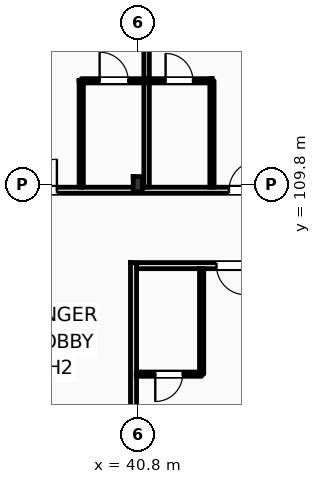
"""IFC4 building model, lengths in metres.
Left out: names, types, materials, properties, quantities, classifications, styles, units other than length and angle.
Written with IfcOpenShell. Run it as: python <this file> out.ifc"""

import sys

from ifc_helpers import new_model, si_unit, direction, frame, frame_2d, origin, origin_2d, place, context, subcontext, project, spatial, rectangle, i_section, extrude, element, fill, save


model = new_model("IFC4")
c1 = context("Model", 3, precision=1e-05, world=origin(), true_north=direction((0.0, 1.0)))
c2 = subcontext(c1, "Body", "Model", "MODEL_VIEW")
j1 = project(units=[si_unit("LENGTHUNIT", "METRE"), si_unit("PLANEANGLEUNIT", "RADIAN")], contexts=[c1])
p1 = place(None, origin())
s1 = spatial("IfcSite", under=j1, at=p1, CompositionType="ELEMENT")
p2 = place(p1, origin())
s2 = spatial("IfcBuilding", under=s1, at=p2, CompositionType="ELEMENT")
p3 = place(p2, frame((0.0, 0.0, 35.4)))
s3 = spatial("IfcBuildingStorey", under=s2, at=p3, CompositionType="ELEMENT", Elevation=35.4)
p4 = place(p3, frame((40.8, 109.8, 0.0), z_axis=(0.0, 0.0, 1.0), x_axis=(1.0, 0.0, 0.0)))
e1 = element("IfcColumn", 1, at=p4, inside=s3, PredefinedType="COLUMN", context=c2, shape_type="SweptSolid", body=[
    extrude(i_section(OverallWidth=0.3, OverallDepth=0.5, WebThickness=0.014, FlangeThickness=0.028, FilletRadius=0.027, at=origin_2d()), origin(), (0.0, 0.0, 1.0), 3.6),
])
p5 = place(p3, frame((10.65, 109.6, 0.0), z_axis=(0.0, 0.0, 1.0), x_axis=(1.0, 0.0, 0.0)))
e2 = element("IfcWall", 2, at=p5, inside=s3, PredefinedType="PARTITIONING", context=c2, shape_type="SweptSolid", body=[
    extrude(rectangle(XDim=84.61, YDim=0.2, at=frame_2d((42.305, 0.0))), origin(), (0.0, 0.0, 1.0), 2.82),
])
p6 = place(p5, frame((12.675, 0.0, 0.0)))
e3 = element("IfcOpeningElement", 3, at=p6, cuts=e2, PredefinedType="OPENING", context=c2, shape_type="SweptSolid", body=[
    extrude(rectangle(XDim=1.02, YDim=2.2, at=frame_2d((0.51, 1.1))), frame((0.0, 0.11, 0.0), z_axis=(0.0, -1.0, 0.0), x_axis=(1.0, 0.0, 0.0)), (0.0, 0.0, 1.0), 0.22),
])
p7 = place(p5, frame((19.62, 0.0, 0.0)))
e4 = element("IfcOpeningElement", 4, at=p7, cuts=e2, PredefinedType="OPENING", context=c2, shape_type="SweptSolid", body=[
    extrude(rectangle(XDim=1.02, YDim=2.2, at=frame_2d((0.51, 1.1))), frame((0.0, 0.11, 0.0), z_axis=(0.0, -1.0, 0.0), x_axis=(1.0, 0.0, 0.0)), (0.0, 0.0, 1.0), 0.22),
])
p8 = place(p5, frame((24.12, 0.0, 0.0)))
e5 = element("IfcOpeningElement", 5, at=p8, cuts=e2, PredefinedType="OPENING", context=c2, shape_type="SweptSolid", body=[
    extrude(rectangle(XDim=1.02, YDim=2.2, at=frame_2d((0.51, 1.1))), frame((0.0, 0.11, 0.0), z_axis=(0.0, -1.0, 0.0), x_axis=(1.0, 0.0, 0.0)), (0.0, 0.0, 1.0), 0.22),
])
p9 = place(p5, frame((26.47, 0.0, 0.0)))
e6 = element("IfcOpeningElement", 6, at=p9, cuts=e2, PredefinedType="OPENING", context=c2, shape_type="SweptSolid", body=[
    extrude(rectangle(XDim=1.02, YDim=2.2, at=frame_2d((0.51, 1.1))), frame((0.0, 0.11, 0.0), z_axis=(0.0, -1.0, 0.0), x_axis=(1.0, 0.0, 0.0)), (0.0, 0.0, 1.0), 0.22),
])
p10 = place(p5, frame((33.15, 0.0, 0.0)))
e7 = element("IfcOpeningElement", 7, at=p10, cuts=e2, PredefinedType="OPENING", context=c2, shape_type="SweptSolid", body=[
    extrude(rectangle(XDim=0.96, YDim=2.2, at=frame_2d((0.48, 1.1))), frame((0.0, 0.11, 0.0), z_axis=(0.0, -1.0, 0.0), x_axis=(1.0, 0.0, 0.0)), (0.0, 0.0, 1.0), 0.22),
])
p11 = place(p5, frame((35.5, 0.0, 0.0)))
e8 = element("IfcOpeningElement", 8, at=p11, cuts=e2, PredefinedType="OPENING", context=c2, shape_type="SweptSolid", body=[
    extrude(rectangle(XDim=0.96, YDim=2.2, at=frame_2d((0.48, 1.1))), frame((0.0, 0.11, 0.0), z_axis=(0.0, -1.0, 0.0), x_axis=(1.0, 0.0, 0.0)), (0.0, 0.0, 1.0), 0.22),
])
p12 = place(p5, frame((42.15, 0.0, 0.0)))
e9 = element("IfcOpeningElement", 9, at=p12, cuts=e2, PredefinedType="OPENING", context=c2, shape_type="SweptSolid", body=[
    extrude(rectangle(XDim=0.96, YDim=2.2, at=frame_2d((0.48, 1.1))), frame((0.0, 0.11, 0.0), z_axis=(0.0, -1.0, 0.0), x_axis=(1.0, 0.0, 0.0)), (0.0, 0.0, 1.0), 0.22),
])
p13 = place(p5, frame((47.15, 0.0, 0.0)))
e10 = element("IfcOpeningElement", 10, at=p13, cuts=e2, PredefinedType="OPENING", context=c2, shape_type="SweptSolid", body=[
    extrude(rectangle(XDim=0.96, YDim=2.2, at=frame_2d((0.48, 1.1))), frame((0.0, 0.11, 0.0), z_axis=(0.0, -1.0, 0.0), x_axis=(1.0, 0.0, 0.0)), (0.0, 0.0, 1.0), 0.22),
])
p14 = place(p5, frame((51.15, 0.0, 0.0)))
e11 = element("IfcOpeningElement", 11, at=p14, cuts=e2, PredefinedType="OPENING", context=c2, shape_type="SweptSolid", body=[
    extrude(rectangle(XDim=0.96, YDim=2.2, at=frame_2d((0.48, 1.1))), frame((0.0, 0.11, 0.0), z_axis=(0.0, -1.0, 0.0), x_axis=(1.0, 0.0, 0.0)), (0.0, 0.0, 1.0), 0.22),
])
p15 = place(p5, frame((55.65, 0.0, 0.0)))
e12 = element("IfcOpeningElement", 12, at=p15, cuts=e2, PredefinedType="OPENING", context=c2, shape_type="SweptSolid", body=[
    extrude(rectangle(XDim=0.96, YDim=2.2, at=frame_2d((0.48, 1.1))), frame((0.0, 0.11, 0.0), z_axis=(0.0, -1.0, 0.0), x_axis=(1.0, 0.0, 0.0)), (0.0, 0.0, 1.0), 0.22),
])
p16 = place(p5, frame((58.0, 0.0, 0.0)))
e13 = element("IfcOpeningElement", 13, at=p16, cuts=e2, PredefinedType="OPENING", context=c2, shape_type="SweptSolid", body=[
    extrude(rectangle(XDim=0.96, YDim=2.2, at=frame_2d((0.48, 1.1))), frame((0.0, 0.11, 0.0), z_axis=(0.0, -1.0, 0.0), x_axis=(1.0, 0.0, 0.0)), (0.0, 0.0, 1.0), 0.22),
])
p17 = place(p5, frame((64.65, 0.0, 0.0)))
e14 = element("IfcOpeningElement", 14, at=p17, cuts=e2, PredefinedType="OPENING", context=c2, shape_type="SweptSolid", body=[
    extrude(rectangle(XDim=0.96, YDim=2.2, at=frame_2d((0.48, 1.1))), frame((0.0, 0.11, 0.0), z_axis=(0.0, -1.0, 0.0), x_axis=(1.0, 0.0, 0.0)), (0.0, 0.0, 1.0), 0.22),
])
p18 = place(p5, frame((66.75, 0.0, 0.0)))
e15 = element("IfcOpeningElement", 15, at=p18, cuts=e2, PredefinedType="OPENING", context=c2, shape_type="SweptSolid", body=[
    extrude(rectangle(XDim=0.96, YDim=2.2, at=frame_2d((0.48, 1.1))), frame((0.0, 0.11, 0.0), z_axis=(0.0, -1.0, 0.0), x_axis=(1.0, 0.0, 0.0)), (0.0, 0.0, 1.0), 0.22),
])
p19 = place(p5, frame((73.65, 0.0, 0.0)))
e16 = element("IfcOpeningElement", 16, at=p19, cuts=e2, PredefinedType="OPENING", context=c2, shape_type="SweptSolid", body=[
    extrude(rectangle(XDim=0.96, YDim=2.2, at=frame_2d((0.48, 1.1))), frame((0.0, 0.11, 0.0), z_axis=(0.0, -1.0, 0.0), x_axis=(1.0, 0.0, 0.0)), (0.0, 0.0, 1.0), 0.22),
])
p20 = place(p5, frame((78.4, 0.0, 0.0)))
e17 = element("IfcOpeningElement", 17, at=p20, cuts=e2, PredefinedType="OPENING", context=c2, shape_type="SweptSolid", body=[
    extrude(rectangle(XDim=0.96, YDim=2.2, at=frame_2d((0.48, 1.1))), frame((0.0, 0.11, 0.0), z_axis=(0.0, -1.0, 0.0), x_axis=(1.0, 0.0, 0.0)), (0.0, 0.0, 1.0), 0.22),
])
p21 = place(p5, frame((80.455, 0.0, 0.0)))
e18 = element("IfcOpeningElement", 18, at=p21, cuts=e2, PredefinedType="OPENING", context=c2, shape_type="SweptSolid", body=[
    extrude(rectangle(XDim=0.96, YDim=2.2, at=frame_2d((0.48, 1.1))), frame((0.0, 0.11, 0.0), z_axis=(0.0, -1.0, 0.0), x_axis=(1.0, 0.0, 0.0)), (0.0, 0.0, 1.0), 0.22),
])
p22 = place(p5, frame((2.716, 0.0, 0.0)))
e19 = element("IfcOpeningElement", 19, at=p22, cuts=e2, PredefinedType="OPENING", context=c2, shape_type="SweptSolid", body=[
    extrude(rectangle(XDim=1.35, YDim=2.25, at=frame_2d((0.675, 1.125))), frame((0.0, 0.11, 0.0), z_axis=(0.0, -1.0, 0.0), x_axis=(1.0, 0.0, 0.0)), (0.0, 0.0, 1.0), 0.22),
])
p23 = place(p5, frame((6.65, 0.0, 0.0)))
e20 = element("IfcOpeningElement", 20, at=p23, cuts=e2, PredefinedType="OPENING", context=c2, shape_type="SweptSolid", body=[
    extrude(rectangle(XDim=1.35, YDim=2.25, at=frame_2d((0.675, 1.125))), frame((0.0, 0.11, 0.0), z_axis=(0.0, -1.0, 0.0), x_axis=(1.0, 0.0, 0.0)), (0.0, 0.0, 1.0), 0.22),
])
p24 = place(p5, frame((10.583, 0.0, 0.0)))
e21 = element("IfcOpeningElement", 21, at=p24, cuts=e2, PredefinedType="OPENING", context=c2, shape_type="SweptSolid", body=[
    extrude(rectangle(XDim=1.35, YDim=2.25, at=frame_2d((0.675, 1.125))), frame((0.0, 0.11, 0.0), z_axis=(0.0, -1.0, 0.0), x_axis=(1.0, 0.0, 0.0)), (0.0, 0.0, 1.0), 0.22),
])
p25 = place(p3, frame((40.76, 107.12, 0.0), z_axis=(0.0, 0.0, 1.0), x_axis=(1.0, 0.0, 0.0)))
e22 = element("IfcWall", 22, at=p25, inside=s3, PredefinedType="PARTITIONING", context=c2, shape_type="SweptSolid", body=[
    extrude(rectangle(XDim=23.44, YDim=0.2, at=frame_2d((11.72, 0.0))), origin(), (0.0, 0.0, 1.0), 3.38),
])
p26 = place(p25, frame((2.629, 0.0, 0.0)))
e23 = element("IfcOpeningElement", 23, at=p26, cuts=e22, PredefinedType="OPENING", context=c2, shape_type="SweptSolid", body=[
    extrude(rectangle(XDim=0.96, YDim=2.2, at=frame_2d((0.48, 1.1))), frame((0.0, 0.11, 0.0), z_axis=(0.0, -1.0, 0.0), x_axis=(1.0, 0.0, 0.0)), (0.0, 0.0, 1.0), 0.22),
])
p27 = place(p25, frame((4.343, 0.0, 0.0)))
e24 = element("IfcOpeningElement", 24, at=p27, cuts=e22, PredefinedType="OPENING", context=c2, shape_type="SweptSolid", body=[
    extrude(rectangle(XDim=0.96, YDim=2.2, at=frame_2d((0.48, 1.1))), frame((0.0, 0.11, 0.0), z_axis=(0.0, -1.0, 0.0), x_axis=(1.0, 0.0, 0.0)), (0.0, 0.0, 1.0), 0.22),
])
p28 = place(p25, frame((10.401, 0.0, 0.0)))
e25 = element("IfcOpeningElement", 25, at=p28, cuts=e22, PredefinedType="OPENING", context=c2, shape_type="SweptSolid", body=[
    extrude(rectangle(XDim=0.96, YDim=2.2, at=frame_2d((0.48, 1.1))), frame((0.0, 0.11, 0.0), z_axis=(0.0, -1.0, 0.0), x_axis=(1.0, 0.0, 0.0)), (0.0, 0.0, 1.0), 0.22),
])
p29 = place(p25, frame((12.159, 0.0, 0.0)))
e26 = element("IfcOpeningElement", 26, at=p29, cuts=e22, PredefinedType="OPENING", context=c2, shape_type="SweptSolid", body=[
    extrude(rectangle(XDim=0.96, YDim=2.2, at=frame_2d((0.48, 1.1))), frame((0.0, 0.11, 0.0), z_axis=(0.0, -1.0, 0.0), x_axis=(1.0, 0.0, 0.0)), (0.0, 0.0, 1.0), 0.22),
])
p30 = place(p25, frame((18.218, 0.0, 0.0)))
e27 = element("IfcOpeningElement", 27, at=p30, cuts=e22, PredefinedType="OPENING", context=c2, shape_type="SweptSolid", body=[
    extrude(rectangle(XDim=0.96, YDim=2.2, at=frame_2d((0.48, 1.1))), frame((0.0, 0.11, 0.0), z_axis=(0.0, -1.0, 0.0), x_axis=(1.0, 0.0, 0.0)), (0.0, 0.0, 1.0), 0.22),
])
p31 = place(p25, frame((20.021, 0.0, 0.0)))
e28 = element("IfcOpeningElement", 28, at=p31, cuts=e22, PredefinedType="OPENING", context=c2, shape_type="SweptSolid", body=[
    extrude(rectangle(XDim=0.96, YDim=2.2, at=frame_2d((0.48, 1.1))), frame((0.0, 0.11, 0.0), z_axis=(0.0, -1.0, 0.0), x_axis=(1.0, 0.0, 0.0)), (0.0, 0.0, 1.0), 0.22),
])
p32 = place(p3, frame((40.66, 98.77, 0.0), z_axis=(0.0, 0.0, 1.0), x_axis=(0.0, 1.0, 0.0)))
e29 = element("IfcWall", 29, at=p32, inside=s3, PredefinedType="PARTITIONING", context=c2, shape_type="SweptSolid", body=[
    extrude(rectangle(XDim=8.45, YDim=0.2, at=frame_2d((4.225, 0.0))), origin(), (0.0, 0.0, 1.0), 3.01),
])
p33 = place(p3, frame((41.09, 109.7, 0.0), z_axis=(0.0, 0.0, 1.0), x_axis=(0.0, 1.0, 0.0)))
e30 = element("IfcWall", 30, at=p33, inside=s3, PredefinedType="PARTITIONING", context=c2, shape_type="SweptSolid", body=[
    extrude(rectangle(XDim=8.15, YDim=0.18, at=frame_2d((4.075, 0.0))), origin(), (0.0, 0.0, 1.0), 3.38),
])
p34 = place(p3, frame((38.94, 109.7, 0.0), z_axis=(0.0, 0.0, 1.0), x_axis=(0.0, 1.0, 0.0)))
e31 = element("IfcWall", 31, at=p34, inside=s3, PredefinedType="PARTITIONING", context=c2, shape_type="SweptSolid", body=[
    extrude(rectangle(XDim=3.5, YDim=0.14, at=frame_2d((1.75, 0.0))), origin(), (0.0, 0.0, 1.0), 3.38),
])
p35 = place(p3, frame((38.94, 113.2, 0.0), z_axis=(0.0, 0.0, 1.0), x_axis=(1.0, 0.0, 0.0)))
e32 = element("IfcWall", 32, at=p35, inside=s3, PredefinedType="PARTITIONING", context=c2, shape_type="SweptSolid", body=[
    extrude(rectangle(XDim=2.15, YDim=0.14, at=frame_2d((1.075, 0.0))), origin(), (0.0, 0.0, 1.0), 3.38),
])
p36 = place(p35, frame((0.605, 0.0, 0.0)))
e33 = element("IfcOpeningElement", 33, at=p36, cuts=e32, PredefinedType="OPENING", context=c2, shape_type="SweptSolid", body=[
    extrude(rectangle(XDim=0.94, YDim=2.15, at=frame_2d((0.47, 1.075))), frame((0.0, 0.08, 0.0), z_axis=(0.0, -1.0, 0.0), x_axis=(1.0, 0.0, 0.0)), (0.0, 0.0, 1.0), 0.16),
])
p37 = place(p3, frame((43.24, 109.7, 0.0), z_axis=(0.0, 0.0, 1.0), x_axis=(0.0, 1.0, 0.0)))
e34 = element("IfcWall", 34, at=p37, inside=s3, PredefinedType="PARTITIONING", context=c2, shape_type="SweptSolid", body=[
    extrude(rectangle(XDim=3.5, YDim=0.14, at=frame_2d((1.75, 0.0))), origin(), (0.0, 0.0, 1.0), 3.07),
])
p38 = place(p3, frame((41.09, 113.2, 0.0), z_axis=(0.0, 0.0, 1.0), x_axis=(1.0, 0.0, 0.0)))
e35 = element("IfcWall", 35, at=p38, inside=s3, PredefinedType="PARTITIONING", context=c2, shape_type="SweptSolid", body=[
    extrude(rectangle(XDim=2.15, YDim=0.14, at=frame_2d((1.075, 0.0))), origin(), (0.0, 0.0, 1.0), 3.38),
])
p39 = place(p38, frame((0.625, 0.0, 0.0)))
e36 = element("IfcOpeningElement", 36, at=p39, cuts=e35, PredefinedType="OPENING", context=c2, shape_type="SweptSolid", body=[
    extrude(rectangle(XDim=0.9, YDim=2.1, at=frame_2d((0.45, 1.05))), frame((0.0, 0.08, 0.0), z_axis=(0.0, -1.0, 0.0), x_axis=(1.0, 0.0, 0.0)), (0.0, 0.0, 1.0), 0.16),
])
p40 = place(p3, frame((42.9, 103.55, 0.0), z_axis=(0.0, 0.0, 1.0), x_axis=(0.0, 1.0, 0.0)))
e37 = element("IfcWall", 37, at=p40, inside=s3, PredefinedType="PARTITIONING", context=c2, shape_type="SweptSolid", body=[
    extrude(rectangle(XDim=3.47, YDim=0.14, at=frame_2d((1.735, 0.0))), origin(), (0.0, 0.0, 1.0), 3.38),
])
p41 = place(p3, frame((40.75, 103.55, 0.0), z_axis=(0.0, 0.0, 1.0), x_axis=(1.0, 0.0, 0.0)))
e38 = element("IfcWall", 38, at=p41, inside=s3, PredefinedType="PARTITIONING", context=c2, shape_type="SweptSolid", body=[
    extrude(rectangle(XDim=2.15, YDim=0.14, at=frame_2d((1.075, 0.0))), origin(), (0.0, 0.0, 1.0), 3.38),
])
p42 = place(p41, frame((0.625, 0.0, 0.0)))
e39 = element("IfcOpeningElement", 39, at=p42, cuts=e38, PredefinedType="OPENING", context=c2, shape_type="SweptSolid", body=[
    extrude(rectangle(XDim=0.9, YDim=2.1, at=frame_2d((0.45, 1.05))), frame((0.0, 0.08, 0.0), z_axis=(0.0, -1.0, 0.0), x_axis=(1.0, 0.0, 0.0)), (0.0, 0.0, 1.0), 0.16),
])
p43 = place(p9, origin())
e40 = element("IfcDoor", 40, at=p43, inside=s3, OperationType="SINGLE_SWING_RIGHT", PredefinedType="DOOR", context=c2, shape_type="SweptSolid", body=[
    extrude(rectangle(XDim=1.02, YDim=2.2, at=frame_2d((0.51, 1.1))), frame((0.0, 0.025, 0.0), z_axis=(0.0, -1.0, 0.0), x_axis=(1.0, 0.0, 0.0)), (0.0, 0.0, 1.0), 0.05),
])
fill(e6, e40)
p44 = place(p36, origin())
e41 = element("IfcDoor", 41, at=p44, inside=s3, OperationType="SINGLE_SWING_LEFT", PredefinedType="DOOR", context=c2, shape_type="SweptSolid", body=[
    extrude(rectangle(XDim=0.94, YDim=2.15, at=frame_2d((0.47, 1.075))), frame((0.0, 0.025, 0.0), z_axis=(0.0, -1.0, 0.0), x_axis=(1.0, 0.0, 0.0)), (0.0, 0.0, 1.0), 0.05),
])
fill(e33, e41)
p45 = place(p10, origin())
e42 = element("IfcDoor", 42, at=p45, inside=s3, OperationType="SINGLE_SWING_RIGHT", PredefinedType="DOOR", context=c2, shape_type="SweptSolid", body=[
    extrude(rectangle(XDim=0.96, YDim=2.2, at=frame_2d((0.48, 1.1))), frame((0.0, 0.025, 0.0), z_axis=(0.0, -1.0, 0.0), x_axis=(1.0, 0.0, 0.0)), (0.0, 0.0, 1.0), 0.05),
])
fill(e7, e42)
p46 = place(p39, origin())
e43 = element("IfcDoor", 43, at=p46, inside=s3, OperationType="SINGLE_SWING_LEFT", PredefinedType="DOOR", context=c2, shape_type="SweptSolid", body=[
    extrude(rectangle(XDim=0.9, YDim=2.1, at=frame_2d((0.45, 1.05))), frame((0.0, 0.025, 0.0), z_axis=(0.0, -1.0, 0.0), x_axis=(1.0, 0.0, 0.0)), (0.0, 0.0, 1.0), 0.05),
])
fill(e36, e43)
p47 = place(p26, frame((0.96, 0.0, 0.0), z_axis=(0.0, 0.0, 1.0), x_axis=(-1.0, 0.0, 0.0)))
e44 = element("IfcDoor", 44, at=p47, inside=s3, OperationType="SINGLE_SWING_RIGHT", PredefinedType="DOOR", context=c2, shape_type="SweptSolid", body=[
    extrude(rectangle(XDim=0.96, YDim=2.2, at=frame_2d((0.48, 1.1))), frame((0.0, 0.025, 0.0), z_axis=(0.0, -1.0, 0.0), x_axis=(1.0, 0.0, 0.0)), (0.0, 0.0, 1.0), 0.05),
])
fill(e23, e44)
p48 = place(p42, frame((0.9, 0.0, 0.0), z_axis=(0.0, 0.0, 1.0), x_axis=(-1.0, 0.0, 0.0)))
e45 = element("IfcDoor", 45, at=p48, inside=s3, OperationType="SINGLE_SWING_LEFT", PredefinedType="DOOR", context=c2, shape_type="SweptSolid", body=[
    extrude(rectangle(XDim=0.9, YDim=2.1, at=frame_2d((0.45, 1.05))), frame((0.0, 0.025, 0.0), z_axis=(0.0, -1.0, 0.0), x_axis=(1.0, 0.0, 0.0)), (0.0, 0.0, 1.0), 0.05),
])
fill(e39, e45)
save(model, sys.argv[1])
